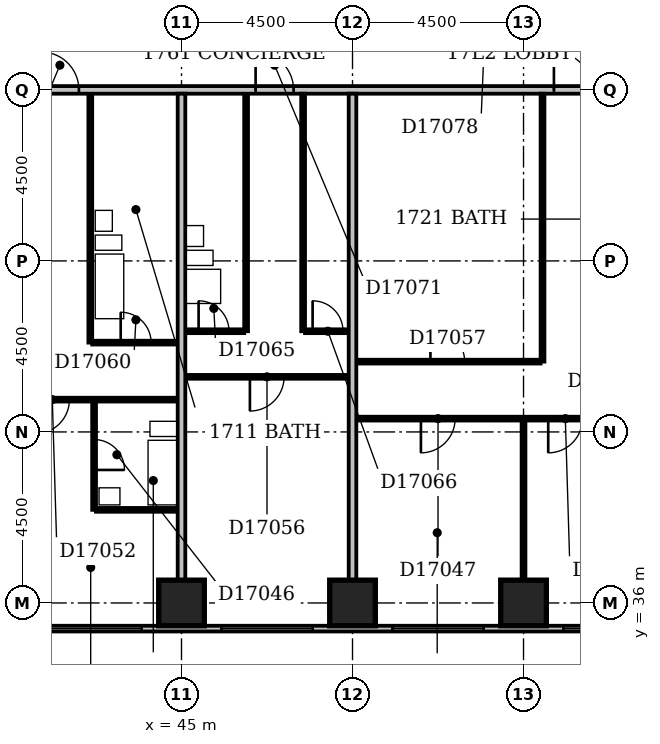
"""IFC4 building model, lengths in metres.
Left out: names, types, materials, properties, quantities, classifications, styles, units other than length and angle.
Written with IfcOpenShell. Run it as: python <this file> out.ifc"""

import sys

from ifc_helpers import new_model, si_unit, direction, frame, frame_2d, origin, origin_2d, place, context, subcontext, project, spatial, rectangle, extrude, element, fill, save


model = new_model("IFC4")
c1 = context("Model", 3, precision=1e-05, world=origin(), true_north=direction((0.0, 1.0)))
c2 = subcontext(c1, "Body", "Model", "MODEL_VIEW")
j1 = project(units=[si_unit("LENGTHUNIT", "METRE"), si_unit("PLANEANGLEUNIT", "RADIAN")], contexts=[c1])
p1 = place(None, origin())
s1 = spatial("IfcSite", under=j1, at=p1, CompositionType="ELEMENT")
p2 = place(p1, origin())
s2 = spatial("IfcBuilding", under=s1, at=p2, CompositionType="ELEMENT")
p3 = place(p2, frame((0.0, 0.0, 72.2)))
s3 = spatial("IfcBuildingStorey", under=s2, at=p3, CompositionType="ELEMENT", Elevation=72.2)
for number, where, z_axis, x_axis in (
    (1, (45.0, 36.0, -0.3), (0.0, 0.0, 1.0), (1.0, 0.0, 0.0)),
    (2, (49.5, 36.0, -0.3), (0.0, 0.0, 1.0), (1.0, 0.0, 0.0)),
    (3, (54.0, 36.0, -0.3), (0.0, 0.0, 1.0), (1.0, 0.0, 0.0)),
):
    element("IfcColumn", number, at=place(p3, frame(where, z_axis=z_axis, x_axis=x_axis)), inside=s3, PredefinedType="COLUMN", context=c2, shape_type="SweptSolid", body=[
        extrude(rectangle(XDim=1.2, YDim=1.2, at=origin_2d()), origin(), (0.0, 0.0, 1.0), 3.6),
    ])
p4 = place(p3, frame((23.1, 35.325, 0.0), z_axis=(0.0, 0.0, 1.0), x_axis=(1.0, 0.0, 0.0)))
e4 = element("IfcWall", 4, at=p4, inside=s3, PredefinedType="STANDARD", context=c2, shape_type="SweptSolid", body=[
    extrude(rectangle(XDim=45.15, YDim=0.15, at=frame_2d((22.575, 0.0))), origin(), (0.0, 0.0, 1.0), 2.7),
])
p5 = place(p4, frame((0.45, 0.0, 0.6)))
e5 = element("IfcOpeningElement", 5, at=p5, cuts=e4, PredefinedType="OPENING", context=c2, shape_type="SweptSolid", body=[
    extrude(rectangle(XDim=2.4, YDim=1.8, at=frame_2d((1.2, 0.9))), frame((0.0, 0.087, 0.0), z_axis=(0.0, -1.0, 0.0), x_axis=(1.0, 0.0, 0.0)), (0.0, 0.0, 1.0), 0.174),
])
p6 = place(p4, frame((4.95, 0.0, 0.6)))
e6 = element("IfcOpeningElement", 6, at=p6, cuts=e4, PredefinedType="OPENING", context=c2, shape_type="SweptSolid", body=[
    extrude(rectangle(XDim=2.4, YDim=1.8, at=frame_2d((1.2, 0.9))), frame((0.0, 0.087, 0.0), z_axis=(0.0, -1.0, 0.0), x_axis=(1.0, 0.0, 0.0)), (0.0, 0.0, 1.0), 0.174),
])
p7 = place(p4, frame((9.275, 0.0, 0.6)))
e7 = element("IfcOpeningElement", 7, at=p7, cuts=e4, PredefinedType="OPENING", context=c2, shape_type="SweptSolid", body=[
    extrude(rectangle(XDim=1.5, YDim=1.8, at=frame_2d((0.75, 0.9))), frame((0.0, 0.087, 0.0), z_axis=(0.0, -1.0, 0.0), x_axis=(1.0, 0.0, 0.0)), (0.0, 0.0, 1.0), 0.174),
])
p8 = place(p4, frame((15.097, 0.0, 0.6)))
e8 = element("IfcOpeningElement", 8, at=p8, cuts=e4, PredefinedType="OPENING", context=c2, shape_type="SweptSolid", body=[
    extrude(rectangle(XDim=1.5, YDim=1.8, at=frame_2d((0.75, 0.9))), frame((0.0, 0.087, 0.0), z_axis=(0.0, -1.0, 0.0), x_axis=(1.0, 0.0, 0.0)), (0.0, 0.0, 1.0), 0.174),
])
p9 = place(p4, frame((18.45, 0.0, 0.6)))
e9 = element("IfcOpeningElement", 9, at=p9, cuts=e4, PredefinedType="OPENING", context=c2, shape_type="SweptSolid", body=[
    extrude(rectangle(XDim=2.4, YDim=1.8, at=frame_2d((1.2, 0.9))), frame((0.0, 0.087, 0.0), z_axis=(0.0, -1.0, 0.0), x_axis=(1.0, 0.0, 0.0)), (0.0, 0.0, 1.0), 0.174),
])
p10 = place(p4, frame((22.95, 0.0, 0.6)))
e10 = element("IfcOpeningElement", 10, at=p10, cuts=e4, PredefinedType="OPENING", context=c2, shape_type="SweptSolid", body=[
    extrude(rectangle(XDim=2.4, YDim=1.8, at=frame_2d((1.2, 0.9))), frame((0.0, 0.087, 0.0), z_axis=(0.0, -1.0, 0.0), x_axis=(1.0, 0.0, 0.0)), (0.0, 0.0, 1.0), 0.174),
])
p11 = place(p4, frame((27.45, 0.0, 0.6)))
e11 = element("IfcOpeningElement", 11, at=p11, cuts=e4, PredefinedType="OPENING", context=c2, shape_type="SweptSolid", body=[
    extrude(rectangle(XDim=2.4, YDim=1.8, at=frame_2d((1.2, 0.9))), frame((0.0, 0.087, 0.0), z_axis=(0.0, -1.0, 0.0), x_axis=(1.0, 0.0, 0.0)), (0.0, 0.0, 1.0), 0.174),
])
p12 = place(p4, frame((31.95, 0.0, 0.6)))
e12 = element("IfcOpeningElement", 12, at=p12, cuts=e4, PredefinedType="OPENING", context=c2, shape_type="SweptSolid", body=[
    extrude(rectangle(XDim=2.4, YDim=1.8, at=frame_2d((1.2, 0.9))), frame((0.0, 0.087, 0.0), z_axis=(0.0, -1.0, 0.0), x_axis=(1.0, 0.0, 0.0)), (0.0, 0.0, 1.0), 0.174),
])
p13 = place(p4, frame((36.45, 0.0, 0.6)))
e13 = element("IfcOpeningElement", 13, at=p13, cuts=e4, PredefinedType="OPENING", context=c2, shape_type="SweptSolid", body=[
    extrude(rectangle(XDim=2.4, YDim=1.8, at=frame_2d((1.2, 0.9))), frame((0.0, 0.087, 0.0), z_axis=(0.0, -1.0, 0.0), x_axis=(1.0, 0.0, 0.0)), (0.0, 0.0, 1.0), 0.174),
])
p14 = place(p4, frame((40.831, 0.0, 0.6)))
e14 = element("IfcOpeningElement", 14, at=p14, cuts=e4, PredefinedType="OPENING", context=c2, shape_type="SweptSolid", body=[
    extrude(rectangle(XDim=0.6, YDim=1.8, at=frame_2d((0.3, 0.9))), frame((0.0, 0.087, 0.0), z_axis=(0.0, -1.0, 0.0), x_axis=(1.0, 0.0, 0.0)), (0.0, 0.0, 1.0), 0.174),
])
p15 = place(p3, frame((45.0, 36.6, 0.0), z_axis=(0.0, 0.0, 1.0), x_axis=(0.0, 1.0, 0.0)))
e15 = element("IfcWall", 15, at=p15, inside=s3, PredefinedType="PARTITIONING", context=c2, shape_type="SweptSolid", body=[
    extrude(rectangle(XDim=12.8, YDim=0.2, at=frame_2d((6.4, 0.0))), origin(), (0.0, 0.0, 1.0), 2.6),
])
p16 = place(p3, frame((49.5, 36.6, 0.0), z_axis=(0.0, 0.0, 1.0), x_axis=(0.0, 1.0, 0.0)))
e16 = element("IfcWall", 16, at=p16, inside=s3, PredefinedType="PARTITIONING", context=c2, shape_type="SweptSolid", body=[
    extrude(rectangle(XDim=12.8, YDim=0.2, at=frame_2d((6.4, 0.0))), origin(), (0.0, 0.0, 1.0), 3.3),
])
p17 = place(p3, frame((54.0, 36.6, 0.0), z_axis=(0.0, 0.0, 1.0), x_axis=(0.0, 1.0, 0.0)))
e17 = element("IfcWall", 17, at=p17, inside=s3, PredefinedType="PARTITIONING", context=c2, shape_type="SweptSolid", body=[
    extrude(rectangle(XDim=4.2, YDim=0.1, at=frame_2d((2.1, 0.0))), origin(), (0.0, 0.0, 1.0), 2.6),
])
p18 = place(p3, frame((42.7, 38.45, 0.0), z_axis=(0.0, 0.0, 1.0), x_axis=(0.0, 1.0, 0.0)))
e18 = element("IfcWall", 18, at=p18, inside=s3, PredefinedType="PLUMBINGWALL", context=c2, shape_type="SweptSolid", body=[
    extrude(rectangle(XDim=2.85, YDim=0.1, at=frame_2d((1.425, 0.0))), origin(), (0.0, 0.0, 1.0), 3.3),
])
p19 = place(p18, frame((1.05, 0.0, 0.0)))
e19 = element("IfcOpeningElement", 19, at=p19, cuts=e18, PredefinedType="OPENING", context=c2, shape_type="SweptSolid", body=[
    extrude(rectangle(XDim=0.8, YDim=2.1, at=frame_2d((0.4, 1.05))), frame((0.0, 0.062, 0.0), z_axis=(0.0, -1.0, 0.0), x_axis=(1.0, 0.0, 0.0)), (0.0, 0.0, 1.0), 0.124),
])
p20 = place(p3, frame((42.75, 38.45, 0.0), z_axis=(0.0, 0.0, 1.0), x_axis=(1.0, 0.0, 0.0)))
e20 = element("IfcWall", 20, at=p20, inside=s3, PredefinedType="PLUMBINGWALL", context=c2, shape_type="SweptSolid", body=[
    extrude(rectangle(XDim=2.15, YDim=0.1, at=frame_2d((1.075, 0.0))), origin(), (0.0, 0.0, 1.0), 3.3),
])
p21 = place(p3, frame((49.6, 40.85, 0.0), z_axis=(0.0, 0.0, 1.0), x_axis=(1.0, 0.0, 0.0)))
e21 = element("IfcWall", 21, at=p21, inside=s3, PredefinedType="PARTITIONING", context=c2, shape_type="SweptSolid", body=[
    extrude(rectangle(XDim=8.8, YDim=0.1, at=frame_2d((4.4, 0.0))), origin(), (0.0, 0.0, 1.0), 3.3),
])
p22 = place(p21, frame((1.7, 0.0, 0.0)))
e22 = element("IfcOpeningElement", 22, at=p22, cuts=e21, PredefinedType="OPENING", context=c2, shape_type="SweptSolid", body=[
    extrude(rectangle(XDim=0.9, YDim=2.1, at=frame_2d((0.45, 1.05))), frame((0.0, 0.062, 0.0), z_axis=(0.0, -1.0, 0.0), x_axis=(1.0, 0.0, 0.0)), (0.0, 0.0, 1.0), 0.124),
])
p23 = place(p21, frame((5.05, 0.0, 0.0)))
e23 = element("IfcOpeningElement", 23, at=p23, cuts=e21, PredefinedType="OPENING", context=c2, shape_type="SweptSolid", body=[
    extrude(rectangle(XDim=0.9, YDim=2.1, at=frame_2d((0.45, 1.05))), frame((0.0, 0.062, 0.0), z_axis=(0.0, -1.0, 0.0), x_axis=(1.0, 0.0, 0.0)), (0.0, 0.0, 1.0), 0.124),
])
p24 = place(p3, frame((36.1, 41.35, 0.0), z_axis=(0.0, 0.0, 1.0), x_axis=(1.0, 0.0, 0.0)))
e24 = element("IfcWall", 24, at=p24, inside=s3, PredefinedType="PARTITIONING", context=c2, shape_type="SweptSolid", body=[
    extrude(rectangle(XDim=8.8, YDim=0.1, at=frame_2d((4.4, 0.0))), origin(), (0.0, 0.0, 1.0), 3.3),
])
p25 = place(p24, frame((1.7, 0.0, 0.0)))
e25 = element("IfcOpeningElement", 25, at=p25, cuts=e24, PredefinedType="OPENING", context=c2, shape_type="SweptSolid", body=[
    extrude(rectangle(XDim=0.9, YDim=2.1, at=frame_2d((0.45, 1.05))), frame((0.0, 0.062, 0.0), z_axis=(0.0, -1.0, 0.0), x_axis=(1.0, 0.0, 0.0)), (0.0, 0.0, 1.0), 0.124),
])
p26 = place(p24, frame((5.05, 0.0, 0.0)))
e26 = element("IfcOpeningElement", 26, at=p26, cuts=e24, PredefinedType="OPENING", context=c2, shape_type="SweptSolid", body=[
    extrude(rectangle(XDim=0.9, YDim=2.1, at=frame_2d((0.45, 1.05))), frame((0.0, 0.062, 0.0), z_axis=(0.0, -1.0, 0.0), x_axis=(1.0, 0.0, 0.0)), (0.0, 0.0, 1.0), 0.124),
])
p27 = place(p3, frame((45.1, 41.95, 0.0), z_axis=(0.0, 0.0, 1.0), x_axis=(1.0, 0.0, 0.0)))
e27 = element("IfcWall", 27, at=p27, inside=s3, PredefinedType="PARTITIONING", context=c2, shape_type="SweptSolid", body=[
    extrude(rectangle(XDim=4.3, YDim=0.1, at=frame_2d((2.15, 0.0))), origin(), (0.0, 0.0, 1.0), 3.3),
])
p28 = place(p27, frame((1.7, 0.0, 0.0)))
e28 = element("IfcOpeningElement", 28, at=p28, cuts=e27, PredefinedType="OPENING", context=c2, shape_type="SweptSolid", body=[
    extrude(rectangle(XDim=0.9, YDim=2.1, at=frame_2d((0.45, 1.05))), frame((0.0, 0.062, 0.0), z_axis=(0.0, -1.0, 0.0), x_axis=(1.0, 0.0, 0.0)), (0.0, 0.0, 1.0), 0.124),
])
p29 = place(p3, frame((49.6, 42.35, 0.0), z_axis=(0.0, 0.0, 1.0), x_axis=(1.0, 0.0, 0.0)))
e29 = element("IfcWall", 29, at=p29, inside=s3, PredefinedType="PARTITIONING", context=c2, shape_type="SweptSolid", body=[
    extrude(rectangle(XDim=4.85, YDim=0.1, at=frame_2d((2.425, 0.0))), origin(), (0.0, 0.0, 1.0), 3.3),
])
p30 = place(p29, frame((1.95, 0.0, 0.0)))
e30 = element("IfcOpeningElement", 30, at=p30, cuts=e29, PredefinedType="OPENING", context=c2, shape_type="SweptSolid", body=[
    extrude(rectangle(XDim=0.9, YDim=2.1, at=frame_2d((0.45, 1.05))), frame((0.0, 0.062, 0.0), z_axis=(0.0, -1.0, 0.0), x_axis=(1.0, 0.0, 0.0)), (0.0, 0.0, 1.0), 0.124),
])
p31 = place(p3, frame((54.5, 42.35, 0.0), z_axis=(0.0, 0.0, 1.0), x_axis=(0.0, 1.0, 0.0)))
e31 = element("IfcWall", 31, at=p31, inside=s3, PredefinedType="PARTITIONING", context=c2, shape_type="SweptSolid", body=[
    extrude(rectangle(XDim=7.05, YDim=0.1, at=frame_2d((3.525, 0.0))), origin(), (0.0, 0.0, 1.0), 2.6),
])
p32 = place(p3, frame((42.6, 42.85, 0.0), z_axis=(0.0, 0.0, 1.0), x_axis=(0.0, 1.0, 0.0)))
e32 = element("IfcWall", 32, at=p32, inside=s3, PredefinedType="PLUMBINGWALL", context=c2, shape_type="SweptSolid", body=[
    extrude(rectangle(XDim=6.55, YDim=0.1, at=frame_2d((3.275, 0.0))), origin(), (0.0, 0.0, 1.0), 3.3),
])
p33 = place(p3, frame((42.65, 42.85, 0.0), z_axis=(0.0, 0.0, 1.0), x_axis=(1.0, 0.0, 0.0)))
e33 = element("IfcWall", 33, at=p33, inside=s3, PredefinedType="PARTITIONING", context=c2, shape_type="SweptSolid", body=[
    extrude(rectangle(XDim=2.25, YDim=0.1, at=frame_2d((1.125, 0.0))), origin(), (0.0, 0.0, 1.0), 3.3),
])
p34 = place(p33, frame((0.75, 0.0, 0.0)))
e34 = element("IfcOpeningElement", 34, at=p34, cuts=e33, PredefinedType="OPENING", context=c2, shape_type="SweptSolid", body=[
    extrude(rectangle(XDim=0.8, YDim=2.1, at=frame_2d((0.4, 1.05))), frame((0.0, 0.062, 0.0), z_axis=(0.0, -1.0, 0.0), x_axis=(1.0, 0.0, 0.0)), (0.0, 0.0, 1.0), 0.124),
])
p35 = place(p3, frame((45.1, 43.15, 0.0), z_axis=(0.0, 0.0, 1.0), x_axis=(1.0, 0.0, 0.0)))
e35 = element("IfcWall", 35, at=p35, inside=s3, PredefinedType="PARTITIONING", context=c2, shape_type="SweptSolid", body=[
    extrude(rectangle(XDim=1.55, YDim=0.1, at=frame_2d((0.775, 0.0))), origin(), (0.0, 0.0, 1.0), 3.3),
])
p36 = place(p35, frame((0.35, 0.0, 0.0)))
e36 = element("IfcOpeningElement", 36, at=p36, cuts=e35, PredefinedType="OPENING", context=c2, shape_type="SweptSolid", body=[
    extrude(rectangle(XDim=0.8, YDim=2.1, at=frame_2d((0.4, 1.05))), frame((0.0, 0.062, 0.0), z_axis=(0.0, -1.0, 0.0), x_axis=(1.0, 0.0, 0.0)), (0.0, 0.0, 1.0), 0.124),
])
p37 = place(p3, frame((46.7, 43.15, 0.0), z_axis=(0.0, 0.0, 1.0), x_axis=(0.0, 1.0, 0.0)))
e37 = element("IfcWall", 37, at=p37, inside=s3, PredefinedType="PLUMBINGWALL", context=c2, shape_type="SweptSolid", body=[
    extrude(rectangle(XDim=6.25, YDim=0.1, at=frame_2d((3.125, 0.0))), origin(), (0.0, 0.0, 1.0), 3.3),
])
p38 = place(p3, frame((48.2, 43.15, 0.0), z_axis=(0.0, 0.0, 1.0), x_axis=(0.0, 1.0, 0.0)))
e38 = element("IfcWall", 38, at=p38, inside=s3, PredefinedType="PARTITIONING", context=c2, shape_type="SweptSolid", body=[
    extrude(rectangle(XDim=6.25, YDim=0.1, at=frame_2d((3.125, 0.0))), origin(), (0.0, 0.0, 1.0), 3.3),
])
p39 = place(p3, frame((48.25, 43.15, 0.0), z_axis=(0.0, 0.0, 1.0), x_axis=(1.0, 0.0, 0.0)))
e39 = element("IfcWall", 39, at=p39, inside=s3, PredefinedType="PARTITIONING", context=c2, shape_type="SweptSolid", body=[
    extrude(rectangle(XDim=1.15, YDim=0.1, at=frame_2d((0.575, 0.0))), origin(), (0.0, 0.0, 1.0), 3.3),
])
p40 = place(p39, frame((0.2, 0.0, 0.0)))
e40 = element("IfcOpeningElement", 40, at=p40, cuts=e39, PredefinedType="OPENING", context=c2, shape_type="SweptSolid", body=[
    extrude(rectangle(XDim=0.8, YDim=2.1, at=frame_2d((0.4, 1.05))), frame((0.0, 0.062, 0.0), z_axis=(0.0, -1.0, 0.0), x_axis=(1.0, 0.0, 0.0)), (0.0, 0.0, 1.0), 0.124),
])
p41 = place(p3, frame((9.1, 49.5, 0.0), z_axis=(0.0, 0.0, 1.0), x_axis=(1.0, 0.0, 0.0)))
e41 = element("IfcWall", 41, at=p41, inside=s3, PredefinedType="PARTITIONING", context=c2, shape_type="SweptSolid", body=[
    extrude(rectangle(XDim=57.8, YDim=0.2, at=frame_2d((28.9, 0.0))), origin(), (0.0, 0.0, 1.0), 3.3),
])
p42 = place(p41, frame((13.7, 0.0, 0.0)))
e42 = element("IfcOpeningElement", 42, at=p42, cuts=e41, PredefinedType="OPENING", context=c2, shape_type="SweptSolid", body=[
    extrude(rectangle(XDim=1.0, YDim=2.1, at=frame_2d((0.5, 1.05))), frame((0.0, 0.112, 0.0), z_axis=(0.0, -1.0, 0.0), x_axis=(1.0, 0.0, 0.0)), (0.0, 0.0, 1.0), 0.224),
])
p43 = place(p41, frame((32.2, 0.0, 0.0)))
e43 = element("IfcOpeningElement", 43, at=p43, cuts=e41, PredefinedType="OPENING", context=c2, shape_type="SweptSolid", body=[
    extrude(rectangle(XDim=1.0, YDim=2.1, at=frame_2d((0.5, 1.05))), frame((0.0, 0.112, 0.0), z_axis=(0.0, -1.0, 0.0), x_axis=(1.0, 0.0, 0.0)), (0.0, 0.0, 1.0), 0.224),
])
p44 = place(p41, frame((37.85, 0.0, 0.0)))
e44 = element("IfcOpeningElement", 44, at=p44, cuts=e41, PredefinedType="OPENING", context=c2, shape_type="SweptSolid", body=[
    extrude(rectangle(XDim=1.0, YDim=2.1, at=frame_2d((0.5, 1.05))), frame((0.0, 0.112, 0.0), z_axis=(0.0, -1.0, 0.0), x_axis=(1.0, 0.0, 0.0)), (0.0, 0.0, 1.0), 0.224),
])
p45 = place(p41, frame((45.7, 0.0, 0.0)))
e45 = element("IfcOpeningElement", 45, at=p45, cuts=e41, PredefinedType="OPENING", context=c2, shape_type="SweptSolid", body=[
    extrude(rectangle(XDim=1.0, YDim=2.1, at=frame_2d((0.5, 1.05))), frame((0.0, 0.112, 0.0), z_axis=(0.0, -1.0, 0.0), x_axis=(1.0, 0.0, 0.0)), (0.0, 0.0, 1.0), 0.224),
])
p46 = place(p41, frame((49.7, 0.0, 0.0)))
e46 = element("IfcOpeningElement", 46, at=p46, cuts=e41, PredefinedType="OPENING", context=c2, shape_type="SweptSolid", body=[
    extrude(rectangle(XDim=1.0, YDim=2.1, at=frame_2d((0.5, 1.05))), frame((0.0, 0.112, 0.0), z_axis=(0.0, -1.0, 0.0), x_axis=(1.0, 0.0, 0.0)), (0.0, 0.0, 1.0), 0.224),
])
p47 = place(p41, frame((8.4, 0.0, 0.0)))
e47 = element("IfcOpeningElement", 47, at=p47, cuts=e41, PredefinedType="OPENING", context=c2, shape_type="SweptSolid", body=[
    extrude(rectangle(XDim=0.9, YDim=2.1, at=frame_2d((0.45, 1.05))), frame((0.0, 0.112, 0.0), z_axis=(0.0, -1.0, 0.0), x_axis=(1.0, 0.0, 0.0)), (0.0, 0.0, 1.0), 0.224),
])
p48 = place(p9, origin())
e48 = element("IfcWindow", 48, at=p48, inside=s3, PartitioningType="SINGLE_PANEL", PredefinedType="WINDOW", context=c2, shape_type="SweptSolid", body=[
    extrude(rectangle(XDim=2.4, YDim=1.8, at=frame_2d((1.2, 0.9))), frame((0.0, 0.03, 0.0), z_axis=(0.0, -1.0, 0.0), x_axis=(1.0, 0.0, 0.0)), (0.0, 0.0, 1.0), 0.06),
])
fill(e9, e48)
p49 = place(p10, origin())
e49 = element("IfcWindow", 49, at=p49, inside=s3, PartitioningType="SINGLE_PANEL", PredefinedType="WINDOW", context=c2, shape_type="SweptSolid", body=[
    extrude(rectangle(XDim=2.4, YDim=1.8, at=frame_2d((1.2, 0.9))), frame((0.0, 0.03, 0.0), z_axis=(0.0, -1.0, 0.0), x_axis=(1.0, 0.0, 0.0)), (0.0, 0.0, 1.0), 0.06),
])
fill(e10, e49)
p50 = place(p11, origin())
e50 = element("IfcWindow", 50, at=p50, inside=s3, PartitioningType="SINGLE_PANEL", PredefinedType="WINDOW", context=c2, shape_type="SweptSolid", body=[
    extrude(rectangle(XDim=2.4, YDim=1.8, at=frame_2d((1.2, 0.9))), frame((0.0, 0.03, 0.0), z_axis=(0.0, -1.0, 0.0), x_axis=(1.0, 0.0, 0.0)), (0.0, 0.0, 1.0), 0.06),
])
fill(e11, e50)
p51 = place(p12, origin())
e51 = element("IfcWindow", 51, at=p51, inside=s3, PartitioningType="SINGLE_PANEL", PredefinedType="WINDOW", context=c2, shape_type="SweptSolid", body=[
    extrude(rectangle(XDim=2.4, YDim=1.8, at=frame_2d((1.2, 0.9))), frame((0.0, 0.03, 0.0), z_axis=(0.0, -1.0, 0.0), x_axis=(1.0, 0.0, 0.0)), (0.0, 0.0, 1.0), 0.06),
])
fill(e12, e51)
p52 = place(p19, frame((0.8, 0.0, 0.0), z_axis=(0.0, 0.0, 1.0), x_axis=(-1.0, 0.0, 0.0)))
e52 = element("IfcDoor", 52, at=p52, inside=s3, OperationType="SINGLE_SWING_RIGHT", PredefinedType="DOOR", context=c2, shape_type="SweptSolid", body=[
    extrude(rectangle(XDim=0.8, YDim=2.1, at=frame_2d((0.4, 1.05))), frame((0.0, 0.025, 0.0), z_axis=(0.0, -1.0, 0.0), x_axis=(1.0, 0.0, 0.0)), (0.0, 0.0, 1.0), 0.05),
])
fill(e19, e52)
p53 = place(p22, frame((0.9, 0.0, 0.0), z_axis=(0.0, 0.0, 1.0), x_axis=(-1.0, 0.0, 0.0)))
e53 = element("IfcDoor", 53, at=p53, inside=s3, OperationType="SINGLE_SWING_RIGHT", PredefinedType="DOOR", context=c2, shape_type="SweptSolid", body=[
    extrude(rectangle(XDim=0.9, YDim=2.1, at=frame_2d((0.45, 1.05))), frame((0.0, 0.025, 0.0), z_axis=(0.0, -1.0, 0.0), x_axis=(1.0, 0.0, 0.0)), (0.0, 0.0, 1.0), 0.05),
])
fill(e22, e53)
p54 = place(p23, frame((0.9, 0.0, 0.0), z_axis=(0.0, 0.0, 1.0), x_axis=(-1.0, 0.0, 0.0)))
e54 = element("IfcDoor", 54, at=p54, inside=s3, OperationType="SINGLE_SWING_RIGHT", PredefinedType="DOOR", context=c2, shape_type="SweptSolid", body=[
    extrude(rectangle(XDim=0.9, YDim=2.1, at=frame_2d((0.45, 1.05))), frame((0.0, 0.025, 0.0), z_axis=(0.0, -1.0, 0.0), x_axis=(1.0, 0.0, 0.0)), (0.0, 0.0, 1.0), 0.05),
])
fill(e23, e54)
p55 = place(p26, frame((0.9, 0.0, 0.0), z_axis=(0.0, 0.0, 1.0), x_axis=(-1.0, 0.0, 0.0)))
e55 = element("IfcDoor", 55, at=p55, inside=s3, OperationType="SINGLE_SWING_RIGHT", PredefinedType="DOOR", context=c2, shape_type="SweptSolid", body=[
    extrude(rectangle(XDim=0.9, YDim=2.1, at=frame_2d((0.45, 1.05))), frame((0.0, 0.025, 0.0), z_axis=(0.0, -1.0, 0.0), x_axis=(1.0, 0.0, 0.0)), (0.0, 0.0, 1.0), 0.05),
])
fill(e26, e55)
p56 = place(p28, frame((0.9, 0.0, 0.0), z_axis=(0.0, 0.0, 1.0), x_axis=(-1.0, 0.0, 0.0)))
e56 = element("IfcDoor", 56, at=p56, inside=s3, OperationType="SINGLE_SWING_RIGHT", PredefinedType="DOOR", context=c2, shape_type="SweptSolid", body=[
    extrude(rectangle(XDim=0.9, YDim=2.1, at=frame_2d((0.45, 1.05))), frame((0.0, 0.025, 0.0), z_axis=(0.0, -1.0, 0.0), x_axis=(1.0, 0.0, 0.0)), (0.0, 0.0, 1.0), 0.05),
])
fill(e28, e56)
p57 = place(p30, origin())
e57 = element("IfcDoor", 57, at=p57, inside=s3, OperationType="SINGLE_SWING_LEFT", PredefinedType="DOOR", context=c2, shape_type="SweptSolid", body=[
    extrude(rectangle(XDim=0.9, YDim=2.1, at=frame_2d((0.45, 1.05))), frame((0.0, 0.025, 0.0), z_axis=(0.0, -1.0, 0.0), x_axis=(1.0, 0.0, 0.0)), (0.0, 0.0, 1.0), 0.05),
])
fill(e30, e57)
p58 = place(p34, origin())
e58 = element("IfcDoor", 58, at=p58, inside=s3, OperationType="SINGLE_SWING_LEFT", PredefinedType="DOOR", context=c2, shape_type="SweptSolid", body=[
    extrude(rectangle(XDim=0.8, YDim=2.1, at=frame_2d((0.4, 1.05))), frame((0.0, 0.025, 0.0), z_axis=(0.0, -1.0, 0.0), x_axis=(1.0, 0.0, 0.0)), (0.0, 0.0, 1.0), 0.05),
])
fill(e34, e58)
p59 = place(p36, origin())
e59 = element("IfcDoor", 59, at=p59, inside=s3, OperationType="SINGLE_SWING_LEFT", PredefinedType="DOOR", context=c2, shape_type="SweptSolid", body=[
    extrude(rectangle(XDim=0.8, YDim=2.1, at=frame_2d((0.4, 1.05))), frame((0.0, 0.025, 0.0), z_axis=(0.0, -1.0, 0.0), x_axis=(1.0, 0.0, 0.0)), (0.0, 0.0, 1.0), 0.05),
])
fill(e36, e59)
p60 = place(p40, origin())
e60 = element("IfcDoor", 60, at=p60, inside=s3, OperationType="SINGLE_SWING_LEFT", PredefinedType="DOOR", context=c2, shape_type="SweptSolid", body=[
    extrude(rectangle(XDim=0.8, YDim=2.1, at=frame_2d((0.4, 1.05))), frame((0.0, 0.025, 0.0), z_axis=(0.0, -1.0, 0.0), x_axis=(1.0, 0.0, 0.0)), (0.0, 0.0, 1.0), 0.05),
])
fill(e40, e60)
p61 = place(p43, origin())
e61 = element("IfcDoor", 61, at=p61, inside=s3, OperationType="SINGLE_SWING_LEFT", PredefinedType="DOOR", context=c2, shape_type="SweptSolid", body=[
    extrude(rectangle(XDim=1.0, YDim=2.1, at=frame_2d((0.5, 1.05))), frame((0.0, 0.025, 0.0), z_axis=(0.0, -1.0, 0.0), x_axis=(1.0, 0.0, 0.0)), (0.0, 0.0, 1.0), 0.05),
])
fill(e43, e61)
p62 = place(p44, origin())
e62 = element("IfcDoor", 62, at=p62, inside=s3, OperationType="SINGLE_SWING_LEFT", PredefinedType="DOOR", context=c2, shape_type="SweptSolid", body=[
    extrude(rectangle(XDim=1.0, YDim=2.1, at=frame_2d((0.5, 1.05))), frame((0.0, 0.025, 0.0), z_axis=(0.0, -1.0, 0.0), x_axis=(1.0, 0.0, 0.0)), (0.0, 0.0, 1.0), 0.05),
])
fill(e44, e62)
p63 = place(p45, origin())
e63 = element("IfcDoor", 63, at=p63, inside=s3, OperationType="SINGLE_SWING_LEFT", PredefinedType="DOOR", context=c2, shape_type="SweptSolid", body=[
    extrude(rectangle(XDim=1.0, YDim=2.1, at=frame_2d((0.5, 1.05))), frame((0.0, 0.025, 0.0), z_axis=(0.0, -1.0, 0.0), x_axis=(1.0, 0.0, 0.0)), (0.0, 0.0, 1.0), 0.05),
])
fill(e45, e63)
save(model, sys.argv[1])
